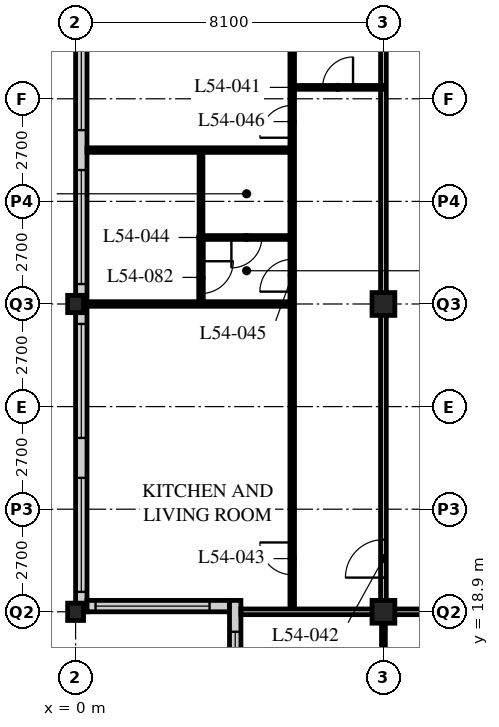
"""IFC4 building model, lengths in metres.
Left out: names, types, materials, properties, quantities, classifications, styles, units other than length and angle.
Written with IfcOpenShell. Run it as: python <this file> out.ifc"""

import sys

from ifc_helpers import new_model, si_unit, direction, frame, frame_2d, origin, origin_2d, place, context, subcontext, project, spatial, rectangle, hollow_rectangle, i_section, extrude, element, fill, save


model = new_model("IFC4")
c1 = context("Model", 3, precision=1e-05, world=origin(), true_north=direction((0.0, 1.0)))
c2 = subcontext(c1, "Body", "Model", "MODEL_VIEW")
j1 = project(units=[si_unit("LENGTHUNIT", "METRE"), si_unit("PLANEANGLEUNIT", "RADIAN")], contexts=[c1])
p1 = place(None, origin())
s1 = spatial("IfcSite", under=j1, at=p1, CompositionType="ELEMENT")
p2 = place(p1, origin())
s2 = spatial("IfcBuilding", under=s1, at=p2, CompositionType="ELEMENT")
p3 = place(p2, frame((0.0, 0.0, 210.0)))
s3 = spatial("IfcBuildingStorey", under=s2, at=p3, CompositionType="ELEMENT", Elevation=210.0)
for number, where, z_axis, x_axis in (
    (1, (0.0, 18.9, 0.0), (0.0, 0.0, 1.0), (1.0, 0.0, 0.0)),
    (2, (0.0, 27.0, 0.0), (0.0, 0.0, 1.0), (1.0, 0.0, 0.0)),
):
    element("IfcColumn", number, at=place(p3, frame(where, z_axis=z_axis, x_axis=x_axis)), inside=s3, PredefinedType="COLUMN", context=c2, shape_type="SweptSolid", body=[
        extrude(i_section(OverallWidth=0.418, OverallDepth=0.456, WebThickness=0.042, FlangeThickness=0.067, FilletRadius=0.015, at=origin_2d()), origin(), (0.0, 0.0, 1.0), 3.6),
    ])
for number, where, z_axis, x_axis in (
    (3, (8.1, 18.9, 0.0), (0.0, 0.0, 1.0), (1.0, 0.0, 0.0)),
    (4, (8.1, 27.0, 0.0), (0.0, 0.0, 1.0), (1.0, 0.0, 0.0)),
):
    element("IfcColumn", number, at=place(p3, frame(where, z_axis=z_axis, x_axis=x_axis)), inside=s3, PredefinedType="COLUMN", context=c2, shape_type="SweptSolid", body=[
        extrude(hollow_rectangle(XDim=0.6, YDim=0.6, WallThickness=0.05, at=origin_2d()), origin(), (0.0, 0.0, 1.0), 3.6),
    ])
p4 = place(p3, frame((0.15, 51.0, 0.0), z_axis=(0.0, 0.0, 1.0), x_axis=(0.0, -1.0, 0.0)))
e5 = element("IfcWall", 5, at=p4, inside=s3, PredefinedType="SOLIDWALL", context=c2, shape_type="SweptSolid", body=[
    extrude(rectangle(XDim=32.1, YDim=0.3, at=frame_2d((16.05, 0.0))), origin(), (0.0, 0.0, 1.0), 3.39),
])
p5 = place(p4, frame((0.225, 0.0, 0.6)))
e6 = element("IfcOpeningElement", 6, at=p5, cuts=e5, PredefinedType="OPENING", context=c2, shape_type="SweptSolid", body=[
    extrude(rectangle(XDim=3.0, YDim=2.4, at=frame_2d((1.5, 1.2))), frame((0.0, 0.16, 0.0), z_axis=(0.0, -1.0, 0.0), x_axis=(1.0, 0.0, 0.0)), (0.0, 0.0, 1.0), 0.32),
])
p6 = place(p4, frame((4.275, 0.0, 0.6)))
e7 = element("IfcOpeningElement", 7, at=p6, cuts=e5, PredefinedType="OPENING", context=c2, shape_type="SweptSolid", body=[
    extrude(rectangle(XDim=3.0, YDim=2.4, at=frame_2d((1.5, 1.2))), frame((0.0, 0.16, 0.0), z_axis=(0.0, -1.0, 0.0), x_axis=(1.0, 0.0, 0.0)), (0.0, 0.0, 1.0), 0.32),
])
p7 = place(p4, frame((8.325, 0.0, 0.6)))
e8 = element("IfcOpeningElement", 8, at=p7, cuts=e5, PredefinedType="OPENING", context=c2, shape_type="SweptSolid", body=[
    extrude(rectangle(XDim=3.0, YDim=2.4, at=frame_2d((1.5, 1.2))), frame((0.0, 0.16, 0.0), z_axis=(0.0, -1.0, 0.0), x_axis=(1.0, 0.0, 0.0)), (0.0, 0.0, 1.0), 0.32),
])
p8 = place(p4, frame((12.375, 0.0, 0.6)))
e9 = element("IfcOpeningElement", 9, at=p8, cuts=e5, PredefinedType="OPENING", context=c2, shape_type="SweptSolid", body=[
    extrude(rectangle(XDim=3.0, YDim=2.4, at=frame_2d((1.5, 1.2))), frame((0.0, 0.16, 0.0), z_axis=(0.0, -1.0, 0.0), x_axis=(1.0, 0.0, 0.0)), (0.0, 0.0, 1.0), 0.32),
])
p9 = place(p4, frame((16.425, 0.0, 0.6)))
e10 = element("IfcOpeningElement", 10, at=p9, cuts=e5, PredefinedType="OPENING", context=c2, shape_type="SweptSolid", body=[
    extrude(rectangle(XDim=3.0, YDim=2.4, at=frame_2d((1.5, 1.2))), frame((0.0, 0.16, 0.0), z_axis=(0.0, -1.0, 0.0), x_axis=(1.0, 0.0, 0.0)), (0.0, 0.0, 1.0), 0.32),
])
p10 = place(p4, frame((20.475, 0.0, 0.6)))
e11 = element("IfcOpeningElement", 11, at=p10, cuts=e5, PredefinedType="OPENING", context=c2, shape_type="SweptSolid", body=[
    extrude(rectangle(XDim=3.0, YDim=2.4, at=frame_2d((1.5, 1.2))), frame((0.0, 0.16, 0.0), z_axis=(0.0, -1.0, 0.0), x_axis=(1.0, 0.0, 0.0)), (0.0, 0.0, 1.0), 0.32),
])
p11 = place(p4, frame((24.525, 0.0, 0.6)))
e12 = element("IfcOpeningElement", 12, at=p11, cuts=e5, PredefinedType="OPENING", context=c2, shape_type="SweptSolid", body=[
    extrude(rectangle(XDim=3.0, YDim=2.4, at=frame_2d((1.5, 1.2))), frame((0.0, 0.16, 0.0), z_axis=(0.0, -1.0, 0.0), x_axis=(1.0, 0.0, 0.0)), (0.0, 0.0, 1.0), 0.32),
])
p12 = place(p4, frame((28.575, 0.0, 0.6)))
e13 = element("IfcOpeningElement", 13, at=p12, cuts=e5, PredefinedType="OPENING", context=c2, shape_type="SweptSolid", body=[
    extrude(rectangle(XDim=3.0, YDim=2.4, at=frame_2d((1.5, 1.2))), frame((0.0, 0.16, 0.0), z_axis=(0.0, -1.0, 0.0), x_axis=(1.0, 0.0, 0.0)), (0.0, 0.0, 1.0), 0.32),
])
p13 = place(p3, frame((0.3, 19.05, 0.0), z_axis=(0.0, 0.0, 1.0), x_axis=(1.0, 0.0, 0.0)))
e14 = element("IfcWall", 14, at=p13, inside=s3, PredefinedType="SOLIDWALL", context=c2, shape_type="SweptSolid", body=[
    extrude(rectangle(XDim=3.75, YDim=0.3, at=frame_2d((1.875, 0.0))), origin(), (0.0, 0.0, 1.0), 3.39),
])
p14 = place(p13, frame((0.225, 0.0, 0.6)))
e15 = element("IfcOpeningElement", 15, at=p14, cuts=e14, PredefinedType="OPENING", context=c2, shape_type="SweptSolid", body=[
    extrude(rectangle(XDim=3.0, YDim=2.0, at=frame_2d((1.5, 1.0))), frame((0.0, 0.16, 0.0), z_axis=(0.0, -1.0, 0.0), x_axis=(1.0, 0.0, 0.0)), (0.0, 0.0, 1.0), 0.32),
])
p15 = place(p3, frame((4.2, 19.2, 0.0), z_axis=(0.0, 0.0, 1.0), x_axis=(0.0, -1.0, 0.0)))
e16 = element("IfcWall", 16, at=p15, inside=s3, PredefinedType="SOLIDWALL", context=c2, shape_type="SweptSolid", body=[
    extrude(rectangle(XDim=4.35, YDim=0.3, at=frame_2d((2.175, 0.0))), origin(), (0.0, 0.0, 1.0), 3.39),
])
p16 = place(p15, frame((0.825, 0.0, 0.6)))
e17 = element("IfcOpeningElement", 17, at=p16, cuts=e16, PredefinedType="OPENING", context=c2, shape_type="SweptSolid", body=[
    extrude(rectangle(XDim=3.0, YDim=2.0, at=frame_2d((1.5, 1.0))), frame((0.0, 0.16, 0.0), z_axis=(0.0, -1.0, 0.0), x_axis=(1.0, 0.0, 0.0)), (0.0, 0.0, 1.0), 0.32),
])
p17 = place(p3, frame((8.1, 18.9, 0.0), z_axis=(0.0, 0.0, 1.0), x_axis=(1.0, 0.0, 0.0)))
e18 = element("IfcWall", 18, at=p17, inside=s3, PredefinedType="PARTITIONING", context=c2, shape_type="SweptSolid", body=[
    extrude(rectangle(XDim=36.45, YDim=0.15, at=frame_2d((18.225, 0.0))), origin(), (0.0, 0.0, 1.0), 2.778),
])
p18 = place(p17, frame((4.45, 0.0, 0.0)))
e19 = element("IfcOpeningElement", 19, at=p18, cuts=e18, PredefinedType="OPENING", context=c2, shape_type="SweptSolid", body=[
    extrude(rectangle(XDim=1.0, YDim=2.1, at=frame_2d((0.5, 1.05))), frame((0.0, 0.085, 0.0), z_axis=(0.0, -1.0, 0.0), x_axis=(1.0, 0.0, 0.0)), (0.0, 0.0, 1.0), 0.17),
])
p19 = place(p17, frame((12.55, 0.0, 0.0)))
e20 = element("IfcOpeningElement", 20, at=p19, cuts=e18, PredefinedType="OPENING", context=c2, shape_type="SweptSolid", body=[
    extrude(rectangle(XDim=1.0, YDim=2.1, at=frame_2d((0.5, 1.05))), frame((0.0, 0.085, 0.0), z_axis=(0.0, -1.0, 0.0), x_axis=(1.0, 0.0, 0.0)), (0.0, 0.0, 1.0), 0.17),
])
p20 = place(p17, frame((29.05, 0.0, 0.0)))
e21 = element("IfcOpeningElement", 21, at=p20, cuts=e18, PredefinedType="OPENING", context=c2, shape_type="SweptSolid", body=[
    extrude(rectangle(XDim=1.0, YDim=2.1, at=frame_2d((0.5, 1.05))), frame((0.0, 0.085, 0.0), z_axis=(0.0, -1.0, 0.0), x_axis=(1.0, 0.0, 0.0)), (0.0, 0.0, 1.0), 0.17),
])
p21 = place(p17, frame((2.625, 0.0, 0.0)))
e22 = element("IfcOpeningElement", 22, at=p21, cuts=e18, PredefinedType="OPENING", context=c2, shape_type="SweptSolid", body=[
    extrude(rectangle(XDim=1.0, YDim=2.1, at=frame_2d((0.5, 1.05))), frame((0.0, 0.085, 0.0), z_axis=(0.0, -1.0, 0.0), x_axis=(1.0, 0.0, 0.0)), (0.0, 0.0, 1.0), 0.17),
])
p22 = place(p17, frame((33.925, 0.0, 0.0)))
e23 = element("IfcOpeningElement", 23, at=p22, cuts=e18, PredefinedType="OPENING", context=c2, shape_type="SweptSolid", body=[
    extrude(rectangle(XDim=1.0, YDim=2.1, at=frame_2d((0.5, 1.05))), frame((0.0, 0.085, 0.0), z_axis=(0.0, -1.0, 0.0), x_axis=(1.0, 0.0, 0.0)), (0.0, 0.0, 1.0), 0.17),
])
p23 = place(p3, frame((8.1, 18.9, 0.0), z_axis=(0.0, 0.0, 1.0), x_axis=(0.0, 1.0, 0.0)))
e24 = element("IfcWall", 24, at=p23, inside=s3, PredefinedType="PARTITIONING", context=c2, shape_type="SweptSolid", body=[
    extrude(rectangle(XDim=28.35, YDim=0.15, at=frame_2d((14.175, 0.0))), origin(), (0.0, 0.0, 1.0), 2.778),
])
p24 = place(p23, frame((0.9, 0.0, 0.0)))
e25 = element("IfcOpeningElement", 25, at=p24, cuts=e24, PredefinedType="OPENING", context=c2, shape_type="SweptSolid", body=[
    extrude(rectangle(XDim=1.0, YDim=2.1, at=frame_2d((0.5, 1.05))), frame((0.0, 0.085, 0.0), z_axis=(0.0, -1.0, 0.0), x_axis=(1.0, 0.0, 0.0)), (0.0, 0.0, 1.0), 0.17),
])
p25 = place(p23, frame((17.1, 0.0, 0.0)))
e26 = element("IfcOpeningElement", 26, at=p25, cuts=e24, PredefinedType="OPENING", context=c2, shape_type="SweptSolid", body=[
    extrude(rectangle(XDim=1.0, YDim=2.1, at=frame_2d((0.5, 1.05))), frame((0.0, 0.085, 0.0), z_axis=(0.0, -1.0, 0.0), x_axis=(1.0, 0.0, 0.0)), (0.0, 0.0, 1.0), 0.17),
])
p26 = place(p23, frame((26.65, 0.0, 0.0)))
e27 = element("IfcOpeningElement", 27, at=p26, cuts=e24, PredefinedType="OPENING", context=c2, shape_type="SweptSolid", body=[
    extrude(rectangle(XDim=1.0, YDim=2.1, at=frame_2d((0.5, 1.05))), frame((0.0, 0.085, 0.0), z_axis=(0.0, -1.0, 0.0), x_axis=(1.0, 0.0, 0.0)), (0.0, 0.0, 1.0), 0.17),
])
p27 = place(p3, frame((5.7, 18.9, 0.0), z_axis=(0.0, 0.0, 1.0), x_axis=(0.0, 1.0, 0.0)))
e28 = element("IfcWall", 28, at=p27, inside=s3, PredefinedType="PARTITIONING", context=c2, shape_type="SweptSolid", body=[
    extrude(rectangle(XDim=24.3, YDim=0.12, at=frame_2d((12.15, 0.0))), origin(), (0.0, 0.0, 1.0), 3.39),
])
p28 = place(p27, frame((0.975, 0.0, 0.0)))
e29 = element("IfcOpeningElement", 29, at=p28, cuts=e28, PredefinedType="OPENING", context=c2, shape_type="SweptSolid", body=[
    extrude(rectangle(XDim=0.85, YDim=2.1, at=frame_2d((0.425, 1.05))), frame((0.0, 0.07, 0.0), z_axis=(0.0, -1.0, 0.0), x_axis=(1.0, 0.0, 0.0)), (0.0, 0.0, 1.0), 0.14),
])
p29 = place(p27, frame((8.425, 0.0, 0.0)))
e30 = element("IfcOpeningElement", 30, at=p29, cuts=e28, PredefinedType="OPENING", context=c2, shape_type="SweptSolid", body=[
    extrude(rectangle(XDim=0.85, YDim=2.1, at=frame_2d((0.425, 1.05))), frame((0.0, 0.07, 0.0), z_axis=(0.0, -1.0, 0.0), x_axis=(1.0, 0.0, 0.0)), (0.0, 0.0, 1.0), 0.14),
])
p30 = place(p27, frame((12.475, 0.0, 0.0)))
e31 = element("IfcOpeningElement", 31, at=p30, cuts=e28, PredefinedType="OPENING", context=c2, shape_type="SweptSolid", body=[
    extrude(rectangle(XDim=0.85, YDim=2.1, at=frame_2d((0.425, 1.05))), frame((0.0, 0.07, 0.0), z_axis=(0.0, -1.0, 0.0), x_axis=(1.0, 0.0, 0.0)), (0.0, 0.0, 1.0), 0.14),
])
p31 = place(p27, frame((17.175, 0.0, 0.0)))
e32 = element("IfcOpeningElement", 32, at=p31, cuts=e28, PredefinedType="OPENING", context=c2, shape_type="SweptSolid", body=[
    extrude(rectangle(XDim=0.85, YDim=2.1, at=frame_2d((0.425, 1.05))), frame((0.0, 0.07, 0.0), z_axis=(0.0, -1.0, 0.0), x_axis=(1.0, 0.0, 0.0)), (0.0, 0.0, 1.0), 0.14),
])
p32 = place(p27, frame((20.575, 0.0, 0.0)))
e33 = element("IfcOpeningElement", 33, at=p32, cuts=e28, PredefinedType="OPENING", context=c2, shape_type="SweptSolid", body=[
    extrude(rectangle(XDim=0.85, YDim=2.1, at=frame_2d((0.425, 1.05))), frame((0.0, 0.07, 0.0), z_axis=(0.0, -1.0, 0.0), x_axis=(1.0, 0.0, 0.0)), (0.0, 0.0, 1.0), 0.14),
])
p33 = place(p3, frame((8.1, 32.7, 0.0), z_axis=(0.0, 0.0, 1.0), x_axis=(-1.0, 0.0, 0.0)))
e34 = element("IfcWall", 34, at=p33, inside=s3, PredefinedType="PARTITIONING", context=c2, shape_type="SweptSolid", body=[
    extrude(rectangle(XDim=2.4, YDim=0.1, at=frame_2d((1.2, 0.0))), origin(), (0.0, 0.0, 1.0), 3.39),
])
p34 = place(p33, frame((0.8, 0.0, 0.0)))
e35 = element("IfcOpeningElement", 35, at=p34, cuts=e34, PredefinedType="OPENING", context=c2, shape_type="SweptSolid", body=[
    extrude(rectangle(XDim=0.8, YDim=2.1, at=frame_2d((0.4, 1.05))), frame((0.0, 0.06, 0.0), z_axis=(0.0, -1.0, 0.0), x_axis=(1.0, 0.0, 0.0)), (0.0, 0.0, 1.0), 0.12),
])
p35 = place(p3, frame((5.7, 28.75, 0.0), z_axis=(0.0, 0.0, 1.0), x_axis=(-1.0, 0.0, 0.0)))
e36 = element("IfcWall", 36, at=p35, inside=s3, PredefinedType="PARTITIONING", context=c2, shape_type="SweptSolid", body=[
    extrude(rectangle(XDim=2.4, YDim=0.1, at=frame_2d((1.2, 0.0))), origin(), (0.0, 0.0, 1.0), 3.39),
])
p36 = place(p35, frame((0.8, 0.0, 0.0)))
e37 = element("IfcOpeningElement", 37, at=p36, cuts=e36, PredefinedType="OPENING", context=c2, shape_type="SweptSolid", body=[
    extrude(rectangle(XDim=0.8, YDim=2.1, at=frame_2d((0.4, 1.05))), frame((0.0, 0.06, 0.0), z_axis=(0.0, -1.0, 0.0), x_axis=(1.0, 0.0, 0.0)), (0.0, 0.0, 1.0), 0.12),
])
p37 = place(p3, frame((3.3, 28.75, 0.0), z_axis=(0.0, 0.0, 1.0), x_axis=(0.0, 1.0, 0.0)))
e38 = element("IfcWall", 38, at=p37, inside=s3, PredefinedType="PARTITIONING", context=c2, shape_type="SweptSolid", body=[
    extrude(rectangle(XDim=2.3, YDim=0.1, at=frame_2d((1.15, 0.0))), origin(), (0.0, 0.0, 1.0), 3.39),
])
p38 = place(p3, frame((5.7, 27.0, 0.0), z_axis=(0.0, 0.0, 1.0), x_axis=(-1.0, 0.0, 0.0)))
e39 = element("IfcWall", 39, at=p38, inside=s3, PredefinedType="PARTITIONING", context=c2, shape_type="SweptSolid", body=[
    extrude(rectangle(XDim=5.4, YDim=0.12, at=frame_2d((2.7, 0.0))), origin(), (0.0, 0.0, 1.0), 2.778),
])
p39 = place(p3, frame((5.7, 31.05, 0.0), z_axis=(0.0, 0.0, 1.0), x_axis=(-1.0, 0.0, 0.0)))
e40 = element("IfcWall", 40, at=p39, inside=s3, PredefinedType="PARTITIONING", context=c2, shape_type="SweptSolid", body=[
    extrude(rectangle(XDim=5.4, YDim=0.12, at=frame_2d((2.7, 0.0))), origin(), (0.0, 0.0, 1.0), 3.39),
])
p40 = place(p3, frame((8.1, 18.9, 0.0), z_axis=(0.0, 0.0, 1.0), x_axis=(0.0, -1.0, 0.0)))
e41 = element("IfcWall", 41, at=p40, inside=s3, PredefinedType="PARTITIONING", context=c2, shape_type="SweptSolid", body=[
    extrude(rectangle(XDim=2.4, YDim=0.1, at=frame_2d((1.2, 0.0))), origin(), (0.0, 0.0, 1.0), 2.778),
])
p41 = place(p3, frame((4.35, 18.9, 0.0), z_axis=(0.0, 0.0, 1.0), x_axis=(1.0, 0.0, 0.0)))
e42 = element("IfcWall", 42, at=p41, inside=s3, PredefinedType="PARTITIONING", context=c2, shape_type="SweptSolid", body=[
    extrude(rectangle(XDim=3.75, YDim=0.15, at=frame_2d((1.875, 0.0))), origin(), (0.0, 0.0, 1.0), 2.778),
])
p42 = place(p3, frame((3.3, 27.0, 0.0), z_axis=(0.0, 0.0, 1.0), x_axis=(0.0, 1.0, 0.0)))
e43 = element("IfcWall", 43, at=p42, inside=s3, PredefinedType="PARTITIONING", context=c2, shape_type="SweptSolid", body=[
    extrude(rectangle(XDim=1.76, YDim=0.12, at=frame_2d((0.88, 0.0))), origin(), (0.0, 0.0, 1.0), 3.39),
])
p43 = place(p42, frame((0.275, 0.0, 0.0)))
e44 = element("IfcOpeningElement", 44, at=p43, cuts=e43, PredefinedType="OPENING", context=c2, shape_type="SweptSolid", body=[
    extrude(rectangle(XDim=0.85, YDim=2.1, at=frame_2d((0.425, 1.05))), frame((0.0, 0.07, 0.0), z_axis=(0.0, -1.0, 0.0), x_axis=(1.0, 0.0, 0.0)), (0.0, 0.0, 1.0), 0.14),
])
p44 = place(p9, origin())
e45 = element("IfcWindow", 45, at=p44, inside=s3, PartitioningType="SINGLE_PANEL", PredefinedType="WINDOW", context=c2, shape_type="SweptSolid", body=[
    extrude(rectangle(XDim=3.0, YDim=2.4, at=frame_2d((1.5, 1.2))), frame((0.0, 0.03, 0.0), z_axis=(0.0, -1.0, 0.0), x_axis=(1.0, 0.0, 0.0)), (0.0, 0.0, 1.0), 0.06),
])
fill(e10, e45)
p45 = place(p10, origin())
e46 = element("IfcWindow", 46, at=p45, inside=s3, PartitioningType="SINGLE_PANEL", PredefinedType="WINDOW", context=c2, shape_type="SweptSolid", body=[
    extrude(rectangle(XDim=3.0, YDim=2.4, at=frame_2d((1.5, 1.2))), frame((0.0, 0.03, 0.0), z_axis=(0.0, -1.0, 0.0), x_axis=(1.0, 0.0, 0.0)), (0.0, 0.0, 1.0), 0.06),
])
fill(e11, e46)
p46 = place(p11, origin())
e47 = element("IfcWindow", 47, at=p46, inside=s3, PartitioningType="SINGLE_PANEL", PredefinedType="WINDOW", context=c2, shape_type="SweptSolid", body=[
    extrude(rectangle(XDim=3.0, YDim=2.4, at=frame_2d((1.5, 1.2))), frame((0.0, 0.03, 0.0), z_axis=(0.0, -1.0, 0.0), x_axis=(1.0, 0.0, 0.0)), (0.0, 0.0, 1.0), 0.06),
])
fill(e12, e47)
p47 = place(p12, origin())
e48 = element("IfcWindow", 48, at=p47, inside=s3, PartitioningType="SINGLE_PANEL", PredefinedType="WINDOW", context=c2, shape_type="SweptSolid", body=[
    extrude(rectangle(XDim=3.0, YDim=2.4, at=frame_2d((1.5, 1.2))), frame((0.0, 0.03, 0.0), z_axis=(0.0, -1.0, 0.0), x_axis=(1.0, 0.0, 0.0)), (0.0, 0.0, 1.0), 0.06),
])
fill(e13, e48)
p48 = place(p14, origin())
e49 = element("IfcWindow", 49, at=p48, inside=s3, PartitioningType="SINGLE_PANEL", PredefinedType="WINDOW", context=c2, shape_type="SweptSolid", body=[
    extrude(rectangle(XDim=3.0, YDim=2.0, at=frame_2d((1.5, 1.0))), frame((0.0, 0.03, 0.0), z_axis=(0.0, -1.0, 0.0), x_axis=(1.0, 0.0, 0.0)), (0.0, 0.0, 1.0), 0.06),
])
fill(e15, e49)
p49 = place(p16, origin())
e50 = element("IfcWindow", 50, at=p49, inside=s3, PartitioningType="SINGLE_PANEL", PredefinedType="WINDOW", context=c2, shape_type="SweptSolid", body=[
    extrude(rectangle(XDim=3.0, YDim=2.0, at=frame_2d((1.5, 1.0))), frame((0.0, 0.03, 0.0), z_axis=(0.0, -1.0, 0.0), x_axis=(1.0, 0.0, 0.0)), (0.0, 0.0, 1.0), 0.06),
])
fill(e17, e50)
p50 = place(p34, origin())
e51 = element("IfcDoor", 51, at=p50, inside=s3, OperationType="SINGLE_SWING_RIGHT", PredefinedType="DOOR", context=c2, shape_type="SweptSolid", body=[
    extrude(rectangle(XDim=0.8, YDim=2.1, at=frame_2d((0.4, 1.05))), frame((0.0, 0.025, 0.0), z_axis=(0.0, -1.0, 0.0), x_axis=(1.0, 0.0, 0.0)), (0.0, 0.0, 1.0), 0.05),
])
fill(e35, e51)
p51 = place(p24, origin())
e52 = element("IfcDoor", 52, at=p51, inside=s3, OperationType="SINGLE_SWING_LEFT", PredefinedType="DOOR", context=c2, shape_type="SweptSolid", body=[
    extrude(rectangle(XDim=1.0, YDim=2.1, at=frame_2d((0.5, 1.05))), frame((0.0, 0.025, 0.0), z_axis=(0.0, -1.0, 0.0), x_axis=(1.0, 0.0, 0.0)), (0.0, 0.0, 1.0), 0.05),
])
fill(e25, e52)
p52 = place(p28, origin())
e53 = element("IfcDoor", 53, at=p52, inside=s3, OperationType="SINGLE_SWING_RIGHT", PredefinedType="DOOR", context=c2, shape_type="SweptSolid", body=[
    extrude(rectangle(XDim=0.85, YDim=2.1, at=frame_2d((0.425, 1.05))), frame((0.0, 0.025, 0.0), z_axis=(0.0, -1.0, 0.0), x_axis=(1.0, 0.0, 0.0)), (0.0, 0.0, 1.0), 0.05),
])
fill(e29, e53)
p53 = place(p36, origin())
e54 = element("IfcDoor", 54, at=p53, inside=s3, OperationType="SINGLE_SWING_RIGHT", PredefinedType="DOOR", context=c2, shape_type="SweptSolid", body=[
    extrude(rectangle(XDim=0.8, YDim=2.1, at=frame_2d((0.4, 1.05))), frame((0.0, 0.025, 0.0), z_axis=(0.0, -1.0, 0.0), x_axis=(1.0, 0.0, 0.0)), (0.0, 0.0, 1.0), 0.05),
])
fill(e37, e54)
p54 = place(p29, origin())
e55 = element("IfcDoor", 55, at=p54, inside=s3, OperationType="SINGLE_SWING_LEFT", PredefinedType="DOOR", context=c2, shape_type="SweptSolid", body=[
    extrude(rectangle(XDim=0.85, YDim=2.1, at=frame_2d((0.425, 1.05))), frame((0.0, 0.025, 0.0), z_axis=(0.0, -1.0, 0.0), x_axis=(1.0, 0.0, 0.0)), (0.0, 0.0, 1.0), 0.05),
])
fill(e30, e55)
p55 = place(p30, origin())
e56 = element("IfcDoor", 56, at=p55, inside=s3, OperationType="SINGLE_SWING_LEFT", PredefinedType="DOOR", context=c2, shape_type="SweptSolid", body=[
    extrude(rectangle(XDim=0.85, YDim=2.1, at=frame_2d((0.425, 1.05))), frame((0.0, 0.025, 0.0), z_axis=(0.0, -1.0, 0.0), x_axis=(1.0, 0.0, 0.0)), (0.0, 0.0, 1.0), 0.05),
])
fill(e31, e56)
p56 = place(p43, origin())
e57 = element("IfcDoor", 57, at=p56, inside=s3, OperationType="SINGLE_SWING_LEFT", PredefinedType="DOOR", context=c2, shape_type="SweptSolid", body=[
    extrude(rectangle(XDim=0.85, YDim=2.1, at=frame_2d((0.425, 1.05))), frame((0.0, 0.025, 0.0), z_axis=(0.0, -1.0, 0.0), x_axis=(1.0, 0.0, 0.0)), (0.0, 0.0, 1.0), 0.05),
])
fill(e44, e57)
save(model, sys.argv[1])
